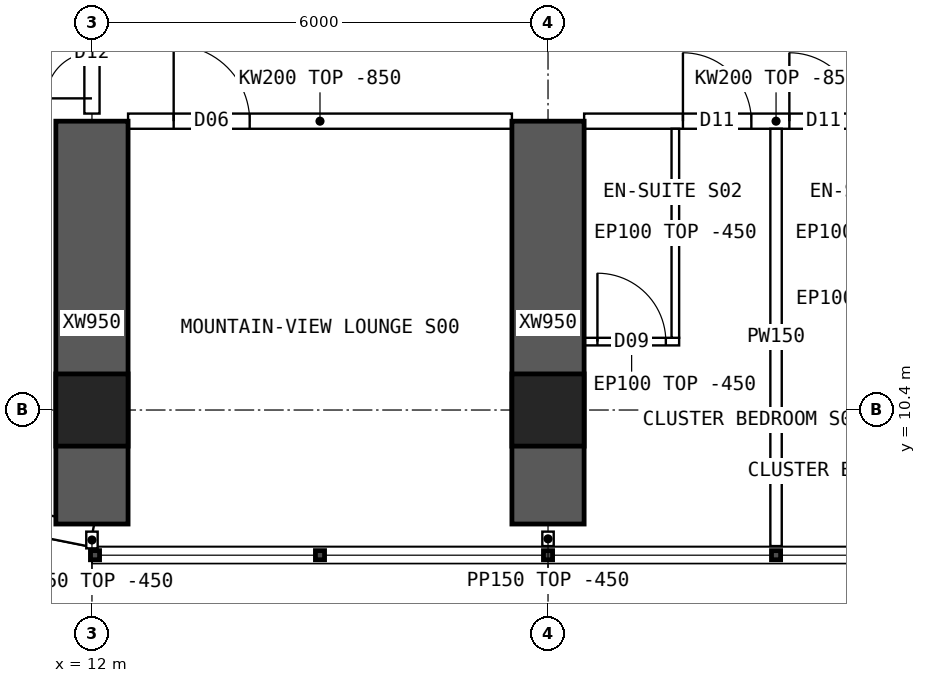
"""IFC4 building model, lengths in metres.
Left out: names, types, materials, properties, quantities, classifications, styles, units other than length and angle.
Written with IfcOpenShell. Run it as: python <this file> out.ifc"""

import sys

from ifc_helpers import new_model, si_unit, direction, frame, frame_2d, origin, origin_2d, place, context, subcontext, project, spatial, polyline, rectangle, hollow_rectangle, outline, extrude, element, fill, save


model = new_model("IFC4")
c1 = context("Model", 3, precision=1e-05, world=origin(), true_north=direction((0.0, 1.0)))
c2 = subcontext(c1, "Body", "Model", "MODEL_VIEW")
j1 = project(units=[si_unit("LENGTHUNIT", "METRE"), si_unit("PLANEANGLEUNIT", "RADIAN")], contexts=[c1])
p1 = place(None, origin())
s1 = spatial("IfcSite", under=j1, at=p1, CompositionType="ELEMENT")
p2 = place(p1, origin())
s2 = spatial("IfcBuilding", under=s1, at=p2, CompositionType="ELEMENT")
p3 = place(p2, frame((0.0, 0.0, 110.65)))
s3 = spatial("IfcBuildingStorey", under=s2, at=p3, CompositionType="ELEMENT", Elevation=110.65)
for number, where, z_axis, x_axis in (
    (1, (12.0, 10.4, 0.0), (0.0, 0.0, 1.0), (1.0, 0.0, 0.0)),
    (2, (18.0, 10.4, 0.0), (0.0, 0.0, 1.0), (1.0, 0.0, 0.0)),
):
    element("IfcColumn", number, at=place(p3, frame(where, z_axis=z_axis, x_axis=x_axis)), inside=s3, PredefinedType="COLUMN", context=c2, shape_type="SweptSolid", body=[
        extrude(hollow_rectangle(XDim=0.95, YDim=0.95, WallThickness=0.095, at=origin_2d()), origin(), (0.0, 0.0, 1.0), 3.75),
    ])
for number, where, z_axis, x_axis in (
    (3, (12.0, 8.9, 0.0), (0.0, 0.0, 1.0), (0.0, 1.0, 0.0)),
    (4, (18.0, 8.9, 0.0), (0.0, 0.0, 1.0), (0.0, 1.0, 0.0)),
):
    element("IfcWall", number, at=place(p3, frame(where, z_axis=z_axis, x_axis=x_axis)), inside=s3, PredefinedType="SHEAR", context=c2, shape_type="SweptSolid", body=[
        extrude(rectangle(XDim=5.3, YDim=0.95, at=frame_2d((2.65, 0.0))), origin(), (0.0, 0.0, 1.0), 3.75),
    ])
p4 = place(p3, frame((8.843, 9.378, 0.0), z_axis=(0.0, 0.0, 1.0), x_axis=(0.980787251524, -0.195080412259, 0.0)))
e5 = element("IfcWall", 5, at=p4, inside=s3, PredefinedType="SOLIDWALL", context=c2, shape_type="SweptSolid", body=[
    extrude(outline(polyline([(-0.03, -0.15), (3.249, -0.15), (3.189, 0.15), (0.03, 0.15), (-0.03, -0.15)])), origin(), (0.0, 0.0, 1.0), 3.3),
])
p5 = place(p4, frame((0.909, 0.0, 0.9)))
e6 = element("IfcOpeningElement", 6, at=p5, cuts=e5, PredefinedType="OPENING", context=c2, shape_type="SweptSolid", body=[
    extrude(rectangle(XDim=1.4, YDim=1.8, at=frame_2d((0.7, 0.9))), frame((0.0, 0.16, 0.0), z_axis=(0.0, -1.0, 0.0), x_axis=(1.0, 0.0, 0.0)), (0.0, 0.0, 1.0), 0.32),
])
p6 = place(p3, frame((12.475, 14.2, 0.0), z_axis=(0.0, 0.0, 1.0), x_axis=(1.0, 0.0, 0.0)))
e7 = element("IfcWall", 7, at=p6, inside=s3, PredefinedType="SOLIDWALL", context=c2, shape_type="SweptSolid", body=[
    extrude(outline(polyline([(0.0, 0.0), (5.05, 0.0), (5.05, 2.9), (0.0, 2.9), (0.0, 0.0)])), frame((0.0, 0.1, 0.0), z_axis=(0.0, -1.0, 0.0), x_axis=(1.0, 0.0, 0.0)), (0.0, 0.0, 1.0), 0.2),
])
p7 = place(p6, frame((0.6, 0.0, 0.0)))
e8 = element("IfcOpeningElement", 8, at=p7, cuts=e7, PredefinedType="OPENING", context=c2, shape_type="SweptSolid", body=[
    extrude(rectangle(XDim=1.0, YDim=2.1, at=frame_2d((0.5, 1.05))), frame((0.0, 0.11, 0.0), z_axis=(0.0, -1.0, 0.0), x_axis=(1.0, 0.0, 0.0)), (0.0, 0.0, 1.0), 0.22),
])
p8 = place(p3, frame((18.475, 14.2, 0.0), z_axis=(0.0, 0.0, 1.0), x_axis=(1.0, 0.0, 0.0)))
e9 = element("IfcWall", 9, at=p8, inside=s3, PredefinedType="SOLIDWALL", context=c2, shape_type="SweptSolid", body=[
    extrude(outline(polyline([(0.0, 0.0), (5.05, 0.0), (5.05, 2.9), (0.0, 2.9), (0.0, 0.0)])), frame((0.0, 0.1, 0.0), z_axis=(0.0, -1.0, 0.0), x_axis=(1.0, 0.0, 0.0)), (0.0, 0.0, 1.0), 0.2),
])
p9 = place(p8, frame((1.3, 0.0, 0.0)))
e10 = element("IfcOpeningElement", 10, at=p9, cuts=e9, PredefinedType="OPENING", context=c2, shape_type="SweptSolid", body=[
    extrude(rectangle(XDim=0.9, YDim=2.1, at=frame_2d((0.45, 1.05))), frame((0.0, 0.11, 0.0), z_axis=(0.0, -1.0, 0.0), x_axis=(1.0, 0.0, 0.0)), (0.0, 0.0, 1.0), 0.22),
])
p10 = place(p8, frame((2.7, 0.0, 0.0)))
e11 = element("IfcOpeningElement", 11, at=p10, cuts=e9, PredefinedType="OPENING", context=c2, shape_type="SweptSolid", body=[
    extrude(rectangle(XDim=0.9, YDim=2.1, at=frame_2d((0.45, 1.05))), frame((0.0, 0.11, 0.0), z_axis=(0.0, -1.0, 0.0), x_axis=(1.0, 0.0, 0.0)), (0.0, 0.0, 1.0), 0.22),
])
p11 = place(p3, frame((21.0, 8.61, 0.0), z_axis=(0.0, 0.0, 1.0), x_axis=(0.0, 1.0, 0.0)))
e12 = element("IfcWall", 12, at=p11, inside=s3, PredefinedType="PARTITIONING", context=c2, shape_type="SweptSolid", body=[
    extrude(outline(polyline([(0.0, 0.0), (5.49, 0.0), (5.49, 2.9), (5.442, 2.9), (5.44, 3.3), (1.992, 3.3), (1.99, 2.9), (1.592, 2.9), (1.59, 3.3), (0.0, 3.3), (0.0, 0.0)])), frame((0.0, 0.075, 0.0), z_axis=(0.0, -1.0, 0.0), x_axis=(1.0, 0.0, 0.0)), (0.0, 0.0, 1.0), 0.15),
])
p12 = place(p3, frame((19.725, 11.3, 0.0), z_axis=(0.0, 0.0, 1.0), x_axis=(-1.0, 0.0, 0.0)))
e13 = element("IfcWall", 13, at=p12, inside=s3, PredefinedType="PARTITIONING", context=c2, shape_type="SweptSolid", body=[
    extrude(rectangle(XDim=1.25, YDim=0.1, at=frame_2d((0.625, 0.0))), origin(), (0.0, 0.0, 1.0), 3.3),
])
p13 = place(p12, frame((0.175, 0.0, 0.0)))
e14 = element("IfcOpeningElement", 14, at=p13, cuts=e13, PredefinedType="OPENING", context=c2, shape_type="SweptSolid", body=[
    extrude(rectangle(XDim=0.9, YDim=2.1, at=frame_2d((0.45, 1.05))), frame((0.0, 0.06, 0.0), z_axis=(0.0, -1.0, 0.0), x_axis=(1.0, 0.0, 0.0)), (0.0, 0.0, 1.0), 0.12),
])
p14 = place(p3, frame((19.675, 11.35, 0.0), z_axis=(0.0, 0.0, 1.0), x_axis=(0.0, 1.0, 0.0)))
e15 = element("IfcWall", 15, at=p14, inside=s3, PredefinedType="PARTITIONING", context=c2, shape_type="SweptSolid", body=[
    extrude(outline(polyline([(0.0, 0.0), (2.75, 0.0), (2.75, 2.9), (2.702, 2.9), (2.7, 3.3), (0.0, 3.3), (0.0, 0.0)])), frame((0.0, 0.05, 0.0), z_axis=(0.0, -1.0, 0.0), x_axis=(1.0, 0.0, 0.0)), (0.0, 0.0, 1.0), 0.1),
])
p15 = place(p3, frame((12.0, 14.3, 0.0), z_axis=(0.0, 0.0, 1.0), x_axis=(0.0, 1.0, 0.0)))
e16 = element("IfcWall", 16, at=p15, inside=s3, PredefinedType="SOLIDWALL", context=c2, shape_type="SweptSolid", body=[
    extrude(outline(polyline([(0.0, 0.0), (1.6, 0.0), (1.6, 2.9), (0.0, 2.9), (0.0, 0.0)])), frame((0.0, 0.1, 0.0), z_axis=(0.0, -1.0, 0.0), x_axis=(1.0, 0.0, 0.0)), (0.0, 0.0, 1.0), 0.2),
])
p16 = place(p15, frame((0.2, 0.0, 0.0)))
e17 = element("IfcOpeningElement", 17, at=p16, cuts=e16, PredefinedType="OPENING", context=c2, shape_type="SweptSolid", body=[
    extrude(rectangle(XDim=1.2, YDim=2.1, at=frame_2d((0.6, 1.05))), frame((0.0, 0.11, 0.0), z_axis=(0.0, -1.0, 0.0), x_axis=(1.0, 0.0, 0.0)), (0.0, 0.0, 1.0), 0.22),
])
p17 = place(p3, frame((12.0, 8.8, 0.0), z_axis=(0.0, 0.0, 1.0), x_axis=(0.0, -1.0, 0.0)))
e18 = element("IfcWall", 18, at=p17, inside=s3, PredefinedType="PARTITIONING", context=c2, shape_type="SweptSolid", body=[
    extrude(rectangle(XDim=0.22, YDim=0.15, at=frame_2d((0.11, 0.0))), origin(), (0.0, 0.0, 1.0), 3.3),
])
p18 = place(p3, frame((18.0, 8.8, 0.0), z_axis=(0.0, 0.0, 1.0), x_axis=(0.0, -1.0, 0.0)))
e19 = element("IfcWall", 19, at=p18, inside=s3, PredefinedType="PARTITIONING", context=c2, shape_type="SweptSolid", body=[
    extrude(rectangle(XDim=0.19, YDim=0.15, at=frame_2d((0.095, 0.0))), origin(), (0.0, 0.0, 1.0), 3.3),
])
p19 = place(p7, origin())
e20 = element("IfcDoor", 20, at=p19, inside=s3, OperationType="SINGLE_SWING_LEFT", PredefinedType="DOOR", context=c2, shape_type="SweptSolid", body=[
    extrude(rectangle(XDim=1.0, YDim=2.1, at=frame_2d((0.5, 1.05))), frame((0.0, 0.025, 0.0), z_axis=(0.0, -1.0, 0.0), x_axis=(1.0, 0.0, 0.0)), (0.0, 0.0, 1.0), 0.05),
])
fill(e8, e20)
p20 = place(p13, origin())
e21 = element("IfcDoor", 21, at=p20, inside=s3, OperationType="SINGLE_SWING_RIGHT", PredefinedType="DOOR", context=c2, shape_type="SweptSolid", body=[
    extrude(rectangle(XDim=0.9, YDim=2.1, at=frame_2d((0.45, 1.05))), frame((0.0, 0.025, 0.0), z_axis=(0.0, -1.0, 0.0), x_axis=(1.0, 0.0, 0.0)), (0.0, 0.0, 1.0), 0.05),
])
fill(e14, e21)
p21 = place(p9, origin())
e22 = element("IfcDoor", 22, at=p21, inside=s3, OperationType="SINGLE_SWING_LEFT", PredefinedType="DOOR", context=c2, shape_type="SweptSolid", body=[
    extrude(rectangle(XDim=0.9, YDim=2.1, at=frame_2d((0.45, 1.05))), frame((0.0, 0.025, 0.0), z_axis=(0.0, -1.0, 0.0), x_axis=(1.0, 0.0, 0.0)), (0.0, 0.0, 1.0), 0.05),
])
fill(e10, e22)
p22 = place(p10, origin())
e23 = element("IfcDoor", 23, at=p22, inside=s3, OperationType="SINGLE_SWING_LEFT", PredefinedType="DOOR", context=c2, shape_type="SweptSolid", body=[
    extrude(rectangle(XDim=0.9, YDim=2.1, at=frame_2d((0.45, 1.05))), frame((0.0, 0.025, 0.0), z_axis=(0.0, -1.0, 0.0), x_axis=(1.0, 0.0, 0.0)), (0.0, 0.0, 1.0), 0.05),
])
fill(e11, e23)
p23 = place(p16, origin())
e24 = element("IfcDoor", 24, at=p23, inside=s3, OperationType="DOUBLE_DOOR_SINGLE_SWING", PredefinedType="DOOR", context=c2, shape_type="SweptSolid", body=[
    extrude(rectangle(XDim=1.2, YDim=2.1, at=frame_2d((0.6, 1.05))), frame((0.0, 0.025, 0.0), z_axis=(0.0, -1.0, 0.0), x_axis=(1.0, 0.0, 0.0)), (0.0, 0.0, 1.0), 0.05),
])
fill(e17, e24)
save(model, sys.argv[1])
